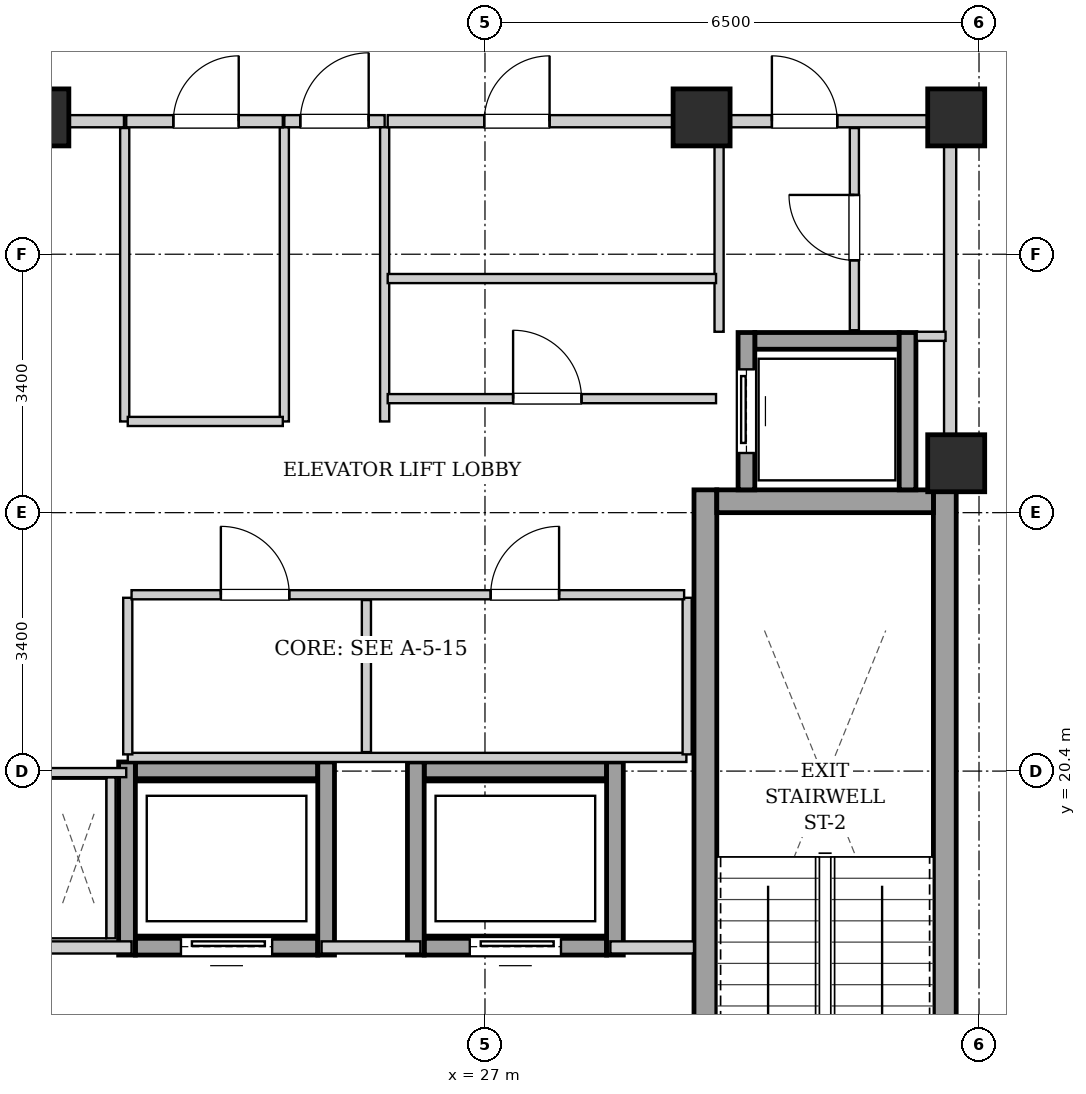
"""IFC4 building model, lengths in metres.
Left out: names, types, materials, properties, quantities, classifications, styles, units other than length and angle.
Written with IfcOpenShell. Run it as: python <this file> out.ifc"""

import sys

from ifc_helpers import new_model, si_unit, direction, frame, frame_2d, origin, origin_2d, place, context, subcontext, project, spatial, rectangle, extrude, element, fill, save


model = new_model("IFC4")
c1 = context("Model", 3, precision=1e-05, world=origin(), true_north=direction((0.0, 1.0)))
c2 = subcontext(c1, "Body", "Model", "MODEL_VIEW")
j1 = project(units=[si_unit("LENGTHUNIT", "METRE"), si_unit("PLANEANGLEUNIT", "RADIAN")], contexts=[c1])
p1 = place(None, origin())
s1 = spatial("IfcSite", under=j1, at=p1, CompositionType="ELEMENT")
p2 = place(p1, origin())
s2 = spatial("IfcBuilding", under=s1, at=p2, CompositionType="ELEMENT")
p3 = place(p2, frame((0.0, 0.0, 234.3)))
s3 = spatial("IfcBuildingStorey", under=s2, at=p3, CompositionType="ELEMENT", Elevation=234.3)
for number, where, z_axis, x_axis in (
    (1, (21.15, 29.0, 0.0), (0.0, 0.0, 1.0), (1.0, 0.0, 0.0)),
    (2, (29.85, 29.0, 0.0), (0.0, 0.0, 1.0), (1.0, 0.0, 0.0)),
    (3, (33.2, 29.0, 0.0), (0.0, 0.0, 1.0), (1.0, 0.0, 0.0)),
    (4, (33.2, 24.45, 0.0), (0.0, 0.0, 1.0), (1.0, 0.0, 0.0)),
):
    element("IfcColumn", number, at=place(p3, frame(where, z_axis=z_axis, x_axis=x_axis)), inside=s3, PredefinedType="COLUMN", context=c2, shape_type="SweptSolid", body=[
        extrude(rectangle(XDim=0.75, YDim=0.75, at=origin_2d()), origin(), (0.0, 0.0, 1.0), 3.4),
    ])
for number, where, z_axis, x_axis in (
    (5, (29.9, 15.1, 0.0), (0.0, 0.0, 1.0), (0.0, 1.0, 0.0)),
    (6, (33.05, 15.1, 0.0), (0.0, 0.0, 1.0), (0.0, 1.0, 0.0)),
):
    element("IfcWall", number, at=place(p3, frame(where, z_axis=z_axis, x_axis=x_axis)), inside=s3, PredefinedType="SHEAR", context=c2, shape_type="SweptSolid", body=[
        extrude(rectangle(XDim=9.0, YDim=0.3, at=frame_2d((4.5, 0.0))), origin(), (0.0, 0.0, 1.0), 3.14),
    ])
p4 = place(p3, frame((30.05, 23.95, 0.0), z_axis=(0.0, 0.0, 1.0), x_axis=(1.0, 0.0, 0.0)))
e7 = element("IfcWall", 7, at=p4, inside=s3, PredefinedType="SHEAR", context=c2, shape_type="SweptSolid", body=[
    extrude(rectangle(XDim=2.85, YDim=0.3, at=frame_2d((1.425, 0.0))), origin(), (0.0, 0.0, 1.0), 3.14),
])
p5 = place(p3, frame((30.55, 26.06, 0.0), z_axis=(0.0, 0.0, 1.0), x_axis=(1.0, 0.0, 0.0)))
e8 = element("IfcWall", 8, at=p5, inside=s3, PredefinedType="SHEAR", context=c2, shape_type="SweptSolid", body=[
    extrude(rectangle(XDim=1.9, YDim=0.22, at=frame_2d((0.95, 0.0))), origin(), (0.0, 0.0, 1.0), 3.14),
])
p6 = place(p3, frame((30.44, 24.1, 0.0), z_axis=(0.0, 0.0, 1.0), x_axis=(0.0, 1.0, 0.0)))
e9 = element("IfcWall", 9, at=p6, inside=s3, PredefinedType="SHEAR", context=c2, shape_type="SweptSolid", body=[
    extrude(rectangle(XDim=2.07, YDim=0.22, at=frame_2d((1.035, 0.0))), origin(), (0.0, 0.0, 1.0), 3.14),
])
p7 = place(p6, frame((0.485, 0.0, 0.0)))
e10 = element("IfcOpeningElement", 10, at=p7, cuts=e9, PredefinedType="OPENING", context=c2, shape_type="SweptSolid", body=[
    extrude(rectangle(XDim=1.1, YDim=2.15, at=frame_2d((0.55, 1.075))), frame((0.0, 0.12, 0.0), z_axis=(0.0, -1.0, 0.0), x_axis=(1.0, 0.0, 0.0)), (0.0, 0.0, 1.0), 0.24),
])
p8 = place(p3, frame((32.56, 24.1, 0.0), z_axis=(0.0, 0.0, 1.0), x_axis=(0.0, 1.0, 0.0)))
e11 = element("IfcWall", 11, at=p8, inside=s3, PredefinedType="SHEAR", context=c2, shape_type="SweptSolid", body=[
    extrude(rectangle(XDim=2.07, YDim=0.22, at=frame_2d((1.035, 0.0))), origin(), (0.0, 0.0, 1.0), 3.14),
])
p9 = place(p3, frame((22.4, 18.09, 0.0), z_axis=(0.0, 0.0, 1.0), x_axis=(1.0, 0.0, 0.0)))
e12 = element("IfcWall", 12, at=p9, inside=s3, PredefinedType="SHEAR", context=c2, shape_type="SweptSolid", body=[
    extrude(rectangle(XDim=2.4, YDim=0.22, at=frame_2d((1.2, 0.0))), origin(), (0.0, 0.0, 1.0), 3.14),
])
p10 = place(p9, frame((0.6, 0.0, 0.0)))
e13 = element("IfcOpeningElement", 13, at=p10, cuts=e12, PredefinedType="OPENING", context=c2, shape_type="SweptSolid", body=[
    extrude(rectangle(XDim=1.2, YDim=2.15, at=frame_2d((0.6, 1.075))), frame((0.0, 0.12, 0.0), z_axis=(0.0, -1.0, 0.0), x_axis=(1.0, 0.0, 0.0)), (0.0, 0.0, 1.0), 0.24),
])
p11 = place(p3, frame((22.4, 20.41, 0.0), z_axis=(0.0, 0.0, 1.0), x_axis=(1.0, 0.0, 0.0)))
e14 = element("IfcWall", 14, at=p11, inside=s3, PredefinedType="SHEAR", context=c2, shape_type="SweptSolid", body=[
    extrude(rectangle(XDim=2.4, YDim=0.22, at=frame_2d((1.2, 0.0))), origin(), (0.0, 0.0, 1.0), 3.14),
])
for number, where, z_axis, x_axis in (
    (15, (22.29, 17.98, 0.0), (0.0, 0.0, 1.0), (0.0, 1.0, 0.0)),
    (16, (24.91, 17.98, 0.0), (0.0, 0.0, 1.0), (0.0, 1.0, 0.0)),
):
    element("IfcWall", number, at=place(p3, frame(where, z_axis=z_axis, x_axis=x_axis)), inside=s3, PredefinedType="SHEAR", context=c2, shape_type="SweptSolid", body=[
        extrude(rectangle(XDim=2.54, YDim=0.22, at=frame_2d((1.27, 0.0))), origin(), (0.0, 0.0, 1.0), 3.14),
    ])
p12 = place(p3, frame((26.2, 18.09, 0.0), z_axis=(0.0, 0.0, 1.0), x_axis=(1.0, 0.0, 0.0)))
e17 = element("IfcWall", 17, at=p12, inside=s3, PredefinedType="SHEAR", context=c2, shape_type="SweptSolid", body=[
    extrude(rectangle(XDim=2.4, YDim=0.22, at=frame_2d((1.2, 0.0))), origin(), (0.0, 0.0, 1.0), 3.14),
])
p13 = place(p12, frame((0.6, 0.0, 0.0)))
e18 = element("IfcOpeningElement", 18, at=p13, cuts=e17, PredefinedType="OPENING", context=c2, shape_type="SweptSolid", body=[
    extrude(rectangle(XDim=1.2, YDim=2.15, at=frame_2d((0.6, 1.075))), frame((0.0, 0.12, 0.0), z_axis=(0.0, -1.0, 0.0), x_axis=(1.0, 0.0, 0.0)), (0.0, 0.0, 1.0), 0.24),
])
p14 = place(p3, frame((26.2, 20.41, 0.0), z_axis=(0.0, 0.0, 1.0), x_axis=(1.0, 0.0, 0.0)))
e19 = element("IfcWall", 19, at=p14, inside=s3, PredefinedType="SHEAR", context=c2, shape_type="SweptSolid", body=[
    extrude(rectangle(XDim=2.4, YDim=0.22, at=frame_2d((1.2, 0.0))), origin(), (0.0, 0.0, 1.0), 3.14),
])
for number, where, z_axis, x_axis in (
    (20, (26.09, 17.98, 0.0), (0.0, 0.0, 1.0), (0.0, 1.0, 0.0)),
    (21, (28.71, 17.98, 0.0), (0.0, 0.0, 1.0), (0.0, 1.0, 0.0)),
):
    element("IfcWall", number, at=place(p3, frame(where, z_axis=z_axis, x_axis=x_axis)), inside=s3, PredefinedType="SHEAR", context=c2, shape_type="SweptSolid", body=[
        extrude(rectangle(XDim=2.54, YDim=0.22, at=frame_2d((1.27, 0.0))), origin(), (0.0, 0.0, 1.0), 3.14),
    ])
p15 = place(p3, frame((21.25, 18.08, 0.0), z_axis=(0.0, 0.0, 1.0), x_axis=(1.0, 0.0, 0.0)))
e22 = element("IfcWall", 22, at=p15, inside=s3, PredefinedType="PARTITIONING", context=c2, shape_type="SweptSolid", body=[
    extrude(rectangle(XDim=1.1, YDim=0.16, at=frame_2d((0.55, 0.0))), origin(), (0.0, 0.0, 1.0), 3.14),
])
p16 = place(p3, frame((24.85, 18.08, 0.0), z_axis=(0.0, 0.0, 1.0), x_axis=(1.0, 0.0, 0.0)))
e23 = element("IfcWall", 23, at=p16, inside=s3, PredefinedType="PARTITIONING", context=c2, shape_type="SweptSolid", body=[
    extrude(rectangle(XDim=1.3, YDim=0.16, at=frame_2d((0.65, 0.0))), origin(), (0.0, 0.0, 1.0), 3.14),
])
p17 = place(p3, frame((28.65, 18.08, 0.0), z_axis=(0.0, 0.0, 1.0), x_axis=(1.0, 0.0, 0.0)))
e24 = element("IfcWall", 24, at=p17, inside=s3, PredefinedType="PARTITIONING", context=c2, shape_type="SweptSolid", body=[
    extrude(rectangle(XDim=1.1, YDim=0.16, at=frame_2d((0.55, 0.0))), origin(), (0.0, 0.0, 1.0), 3.14),
])
p18 = place(p3, frame((33.12, 24.12, 0.0), z_axis=(0.0, 0.0, 1.0), x_axis=(0.0, 1.0, 0.0)))
e25 = element("IfcWall", 25, at=p18, inside=s3, PredefinedType="PARTITIONING", context=c2, shape_type="SweptSolid", body=[
    extrude(rectangle(XDim=4.76, YDim=0.16, at=frame_2d((2.38, 0.0))), origin(), (0.0, 0.0, 1.0), 3.14),
])
p19 = place(p3, frame((24.36, 28.95, 0.0), z_axis=(0.0, 0.0, 1.0), x_axis=(1.0, 0.0, 0.0)))
e26 = element("IfcWall", 26, at=p19, inside=s3, PredefinedType="PARTITIONING", context=c2, shape_type="SweptSolid", body=[
    extrude(rectangle(XDim=1.32, YDim=0.16, at=frame_2d((0.66, 0.0))), origin(), (0.0, 0.0, 1.0), 2.668),
])
p20 = place(p19, frame((0.21, 0.0, 0.0)))
e27 = element("IfcOpeningElement", 27, at=p20, cuts=e26, PredefinedType="OPENING", context=c2, shape_type="SweptSolid", body=[
    extrude(rectangle(XDim=0.9, YDim=2.05, at=frame_2d((0.45, 1.025))), frame((0.0, 0.09, 0.0), z_axis=(0.0, -1.0, 0.0), x_axis=(1.0, 0.0, 0.0)), (0.0, 0.0, 1.0), 0.18),
])
p21 = place(p3, frame((17.96, 28.95, 0.0), z_axis=(0.0, 0.0, 1.0), x_axis=(1.0, 0.0, 0.0)))
e28 = element("IfcWall", 28, at=p21, inside=s3, PredefinedType="PARTITIONING", context=c2, shape_type="SweptSolid", body=[
    extrude(rectangle(XDim=4.29, YDim=0.16, at=frame_2d((2.145, 0.0))), origin(), (0.0, 0.0, 1.0), 2.668),
])
p22 = place(p21, frame((1.715, 0.0, 0.0)))
e29 = element("IfcOpeningElement", 29, at=p22, cuts=e28, PredefinedType="OPENING", context=c2, shape_type="SweptSolid", body=[
    extrude(rectangle(XDim=0.86, YDim=2.05, at=frame_2d((0.43, 1.025))), frame((0.0, 0.09, 0.0), z_axis=(0.0, -1.0, 0.0), x_axis=(1.0, 0.0, 0.0)), (0.0, 0.0, 1.0), 0.18),
])
p23 = place(p3, frame((22.08, 18.2, 0.0), z_axis=(0.0, 0.0, 1.0), x_axis=(0.0, 1.0, 0.0)))
e30 = element("IfcWall", 30, at=p23, inside=s3, PredefinedType="PARTITIONING", context=c2, shape_type="SweptSolid", body=[
    extrude(rectangle(XDim=2.12, YDim=0.12, at=frame_2d((1.06, 0.0))), origin(), (0.0, 0.0, 1.0), 3.14),
])
p24 = place(p3, frame((22.28, 20.38, 0.0), z_axis=(0.0, 0.0, 1.0), x_axis=(-1.0, 0.0, 0.0)))
e31 = element("IfcWall", 31, at=p24, inside=s3, PredefinedType="PARTITIONING", context=c2, shape_type="SweptSolid", body=[
    extrude(rectangle(XDim=1.02, YDim=0.12, at=frame_2d((0.51, 0.0))), origin(), (0.0, 0.0, 1.0), 3.14),
])
for number, where, z_axis, x_axis in (
    (32, (24.36, 25.0, 0.0), (0.0, 0.0, 1.0), (0.0, 1.0, 0.0)),
    (33, (25.68, 25.0, 0.0), (0.0, 0.0, 1.0), (0.0, 1.0, 0.0)),
):
    element("IfcWall", number, at=place(p3, frame(where, z_axis=z_axis, x_axis=x_axis)), inside=s3, PredefinedType="PARTITIONING", context=c2, shape_type="SweptSolid", body=[
        extrude(rectangle(XDim=3.87, YDim=0.12, at=frame_2d((1.935, 0.0))), origin(), (0.0, 0.0, 1.0), 3.14),
    ])
p25 = place(p3, frame((30.08, 26.18, 0.0), z_axis=(0.0, 0.0, 1.0), x_axis=(0.0, 1.0, 0.0)))
e34 = element("IfcWall", 34, at=p25, inside=s3, PredefinedType="PARTITIONING", context=c2, shape_type="SweptSolid", body=[
    extrude(rectangle(XDim=2.68, YDim=0.12, at=frame_2d((1.34, 0.0))), origin(), (0.0, 0.0, 1.0), 3.14),
])
p26 = place(p3, frame((32.68, 26.12, 0.0), z_axis=(0.0, 0.0, 1.0), x_axis=(1.0, 0.0, 0.0)))
e35 = element("IfcWall", 35, at=p26, inside=s3, PredefinedType="PARTITIONING", context=c2, shape_type="SweptSolid", body=[
    extrude(rectangle(XDim=0.38, YDim=0.12, at=frame_2d((0.19, 0.0))), origin(), (0.0, 0.0, 1.0), 3.14),
])
p27 = place(p3, frame((31.86, 26.2, 0.0), z_axis=(0.0, 0.0, 1.0), x_axis=(0.0, 1.0, 0.0)))
e36 = element("IfcWall", 36, at=p27, inside=s3, PredefinedType="PARTITIONING", context=c2, shape_type="SweptSolid", body=[
    extrude(rectangle(XDim=2.66, YDim=0.12, at=frame_2d((1.33, 0.0))), origin(), (0.0, 0.0, 1.0), 3.14),
])
p28 = place(p27, frame((0.92, 0.0, 0.0)))
e37 = element("IfcOpeningElement", 37, at=p28, cuts=e36, PredefinedType="OPENING", context=c2, shape_type="SweptSolid", body=[
    extrude(rectangle(XDim=0.86, YDim=2.05, at=frame_2d((0.43, 1.025))), frame((0.0, 0.07, 0.0), z_axis=(0.0, -1.0, 0.0), x_axis=(1.0, 0.0, 0.0)), (0.0, 0.0, 1.0), 0.14),
])
p29 = place(p3, frame((30.08, 28.95, 0.0), z_axis=(0.0, 0.0, 1.0), x_axis=(1.0, 0.0, 0.0)))
e38 = element("IfcWall", 38, at=p29, inside=s3, PredefinedType="PARTITIONING", context=c2, shape_type="SweptSolid", body=[
    extrude(rectangle(XDim=2.96, YDim=0.16, at=frame_2d((1.48, 0.0))), origin(), (0.0, 0.0, 1.0), 3.14),
])
p30 = place(p29, frame((0.695, 0.0, 0.0)))
e39 = element("IfcOpeningElement", 39, at=p30, cuts=e38, PredefinedType="OPENING", context=c2, shape_type="SweptSolid", body=[
    extrude(rectangle(XDim=0.86, YDim=2.05, at=frame_2d((0.43, 1.025))), frame((0.0, 0.09, 0.0), z_axis=(0.0, -1.0, 0.0), x_axis=(1.0, 0.0, 0.0)), (0.0, 0.0, 1.0), 0.18),
])
p31 = place(p3, frame((22.26, 25.0, 0.0), z_axis=(0.0, 0.0, 1.0), x_axis=(0.0, 1.0, 0.0)))
e40 = element("IfcWall", 40, at=p31, inside=s3, PredefinedType="PARTITIONING", context=c2, shape_type="SweptSolid", body=[
    extrude(rectangle(XDim=3.86, YDim=0.12, at=frame_2d((1.93, 0.0))), origin(), (0.0, 0.0, 1.0), 3.14),
])
p32 = place(p3, frame((22.3, 25.0, 0.0), z_axis=(0.0, 0.0, 1.0), x_axis=(1.0, 0.0, 0.0)))
e41 = element("IfcWall", 41, at=p32, inside=s3, PredefinedType="PARTITIONING", context=c2, shape_type="SweptSolid", body=[
    extrude(rectangle(XDim=2.04, YDim=0.12, at=frame_2d((1.02, 0.0))), origin(), (0.0, 0.0, 1.0), 3.14),
])
p33 = place(p3, frame((22.28, 28.95, 0.0), z_axis=(0.0, 0.0, 1.0), x_axis=(1.0, 0.0, 0.0)))
e42 = element("IfcWall", 42, at=p33, inside=s3, PredefinedType="PARTITIONING", context=c2, shape_type="SweptSolid", body=[
    extrude(rectangle(XDim=2.06, YDim=0.16, at=frame_2d((1.03, 0.0))), origin(), (0.0, 0.0, 1.0), 2.668),
])
p34 = place(p33, frame((0.62, 0.0, 0.0)))
e43 = element("IfcOpeningElement", 43, at=p34, cuts=e42, PredefinedType="OPENING", context=c2, shape_type="SweptSolid", body=[
    extrude(rectangle(XDim=0.86, YDim=2.05, at=frame_2d((0.43, 1.025))), frame((0.0, 0.09, 0.0), z_axis=(0.0, -1.0, 0.0), x_axis=(1.0, 0.0, 0.0)), (0.0, 0.0, 1.0), 0.18),
])
p35 = place(p3, frame((25.72, 26.88, 0.0), z_axis=(0.0, 0.0, 1.0), x_axis=(1.0, 0.0, 0.0)))
e44 = element("IfcWall", 44, at=p35, inside=s3, PredefinedType="PARTITIONING", context=c2, shape_type="SweptSolid", body=[
    extrude(rectangle(XDim=4.32, YDim=0.12, at=frame_2d((2.16, 0.0))), origin(), (0.0, 0.0, 1.0), 3.14),
])
p36 = place(p3, frame((25.72, 25.3, 0.0), z_axis=(0.0, 0.0, 1.0), x_axis=(1.0, 0.0, 0.0)))
e45 = element("IfcWall", 45, at=p36, inside=s3, PredefinedType="PARTITIONING", context=c2, shape_type="SweptSolid", body=[
    extrude(rectangle(XDim=4.32, YDim=0.12, at=frame_2d((2.16, 0.0))), origin(), (0.0, 0.0, 1.0), 3.14),
])
p37 = place(p36, frame((1.65, 0.0, 0.0)))
e46 = element("IfcOpeningElement", 46, at=p37, cuts=e45, PredefinedType="OPENING", context=c2, shape_type="SweptSolid", body=[
    extrude(rectangle(XDim=0.9, YDim=2.05, at=frame_2d((0.45, 1.025))), frame((0.0, 0.07, 0.0), z_axis=(0.0, -1.0, 0.0), x_axis=(1.0, 0.0, 0.0)), (0.0, 0.0, 1.0), 0.14),
])
p38 = place(p3, frame((25.72, 28.95, 0.0), z_axis=(0.0, 0.0, 1.0), x_axis=(1.0, 0.0, 0.0)))
e47 = element("IfcWall", 47, at=p38, inside=s3, PredefinedType="PARTITIONING", context=c2, shape_type="SweptSolid", body=[
    extrude(rectangle(XDim=4.32, YDim=0.16, at=frame_2d((2.16, 0.0))), origin(), (0.0, 0.0, 1.0), 2.668),
])
p39 = place(p38, frame((1.27, 0.0, 0.0)))
e48 = element("IfcOpeningElement", 48, at=p39, cuts=e47, PredefinedType="OPENING", context=c2, shape_type="SweptSolid", body=[
    extrude(rectangle(XDim=0.86, YDim=2.05, at=frame_2d((0.43, 1.025))), frame((0.0, 0.09, 0.0), z_axis=(0.0, -1.0, 0.0), x_axis=(1.0, 0.0, 0.0)), (0.0, 0.0, 1.0), 0.18),
])
p40 = place(p3, frame((22.3, 20.58, 0.0), z_axis=(0.0, 0.0, 1.0), x_axis=(1.0, 0.0, 0.0)))
e49 = element("IfcWall", 49, at=p40, inside=s3, PredefinedType="PARTITIONING", context=c2, shape_type="SweptSolid", body=[
    extrude(rectangle(XDim=7.35, YDim=0.12, at=frame_2d((3.675, 0.0))), origin(), (0.0, 0.0, 1.0), 3.14),
])
for number, where, z_axis, x_axis in (
    (50, (22.3, 20.62, 0.0), (0.0, 0.0, 1.0), (0.0, 1.0, 0.0)),
    (51, (29.66, 20.62, 0.0), (0.0, 0.0, 1.0), (0.0, 1.0, 0.0)),
):
    element("IfcWall", number, at=place(p3, frame(where, z_axis=z_axis, x_axis=x_axis)), inside=s3, PredefinedType="PARTITIONING", context=c2, shape_type="SweptSolid", body=[
        extrude(rectangle(XDim=2.06, YDim=0.12, at=frame_2d((1.03, 0.0))), origin(), (0.0, 0.0, 1.0), 3.14),
    ])
p41 = place(p3, frame((25.44, 20.65, 0.0), z_axis=(0.0, 0.0, 1.0), x_axis=(0.0, 1.0, 0.0)))
e52 = element("IfcWall", 52, at=p41, inside=s3, PredefinedType="PARTITIONING", context=c2, shape_type="SweptSolid", body=[
    extrude(rectangle(XDim=2.0, YDim=0.12, at=frame_2d((1.0, 0.0))), origin(), (0.0, 0.0, 1.0), 3.14),
])
p42 = place(p3, frame((22.35, 22.72, 0.0), z_axis=(0.0, 0.0, 1.0), x_axis=(1.0, 0.0, 0.0)))
e53 = element("IfcWall", 53, at=p42, inside=s3, PredefinedType="PARTITIONING", context=c2, shape_type="SweptSolid", body=[
    extrude(rectangle(XDim=7.27, YDim=0.12, at=frame_2d((3.635, 0.0))), origin(), (0.0, 0.0, 1.0), 3.14),
])
p43 = place(p42, frame((1.175, 0.0, 0.0)))
e54 = element("IfcOpeningElement", 54, at=p43, cuts=e53, PredefinedType="OPENING", context=c2, shape_type="SweptSolid", body=[
    extrude(rectangle(XDim=0.9, YDim=2.05, at=frame_2d((0.45, 1.025))), frame((0.0, 0.07, 0.0), z_axis=(0.0, -1.0, 0.0), x_axis=(1.0, 0.0, 0.0)), (0.0, 0.0, 1.0), 0.14),
])
p44 = place(p42, frame((4.725, 0.0, 0.0)))
e55 = element("IfcOpeningElement", 55, at=p44, cuts=e53, PredefinedType="OPENING", context=c2, shape_type="SweptSolid", body=[
    extrude(rectangle(XDim=0.9, YDim=2.05, at=frame_2d((0.45, 1.025))), frame((0.0, 0.07, 0.0), z_axis=(0.0, -1.0, 0.0), x_axis=(1.0, 0.0, 0.0)), (0.0, 0.0, 1.0), 0.14),
])
p45 = place(p7, origin())
e56 = element("IfcDoor", 56, at=p45, inside=s3, OperationType="SLIDING_TO_LEFT", PredefinedType="DOOR", context=c2, shape_type="SweptSolid", body=[
    extrude(rectangle(XDim=1.1, YDim=2.15, at=frame_2d((0.55, 1.075))), frame((0.0, 0.025, 0.0), z_axis=(0.0, -1.0, 0.0), x_axis=(1.0, 0.0, 0.0)), (0.0, 0.0, 1.0), 0.05),
])
fill(e10, e56)
p46 = place(p10, origin())
e57 = element("IfcDoor", 57, at=p46, inside=s3, OperationType="SLIDING_TO_LEFT", PredefinedType="DOOR", context=c2, shape_type="SweptSolid", body=[
    extrude(rectangle(XDim=1.2, YDim=2.15, at=frame_2d((0.6, 1.075))), frame((0.0, 0.025, 0.0), z_axis=(0.0, -1.0, 0.0), x_axis=(1.0, 0.0, 0.0)), (0.0, 0.0, 1.0), 0.05),
])
fill(e13, e57)
p47 = place(p13, origin())
e58 = element("IfcDoor", 58, at=p47, inside=s3, OperationType="SLIDING_TO_LEFT", PredefinedType="DOOR", context=c2, shape_type="SweptSolid", body=[
    extrude(rectangle(XDim=1.2, YDim=2.15, at=frame_2d((0.6, 1.075))), frame((0.0, 0.025, 0.0), z_axis=(0.0, -1.0, 0.0), x_axis=(1.0, 0.0, 0.0)), (0.0, 0.0, 1.0), 0.05),
])
fill(e18, e58)
p48 = place(p20, origin())
e59 = element("IfcDoor", 59, at=p48, inside=s3, OperationType="SINGLE_SWING_RIGHT", PredefinedType="DOOR", context=c2, shape_type="SweptSolid", body=[
    extrude(rectangle(XDim=0.9, YDim=2.05, at=frame_2d((0.45, 1.025))), frame((0.0, 0.025, 0.0), z_axis=(0.0, -1.0, 0.0), x_axis=(1.0, 0.0, 0.0)), (0.0, 0.0, 1.0), 0.05),
])
fill(e27, e59)
p49 = place(p28, origin())
e60 = element("IfcDoor", 60, at=p49, inside=s3, OperationType="SINGLE_SWING_RIGHT", PredefinedType="DOOR", context=c2, shape_type="SweptSolid", body=[
    extrude(rectangle(XDim=0.86, YDim=2.05, at=frame_2d((0.43, 1.025))), frame((0.0, 0.025, 0.0), z_axis=(0.0, -1.0, 0.0), x_axis=(1.0, 0.0, 0.0)), (0.0, 0.0, 1.0), 0.05),
])
fill(e37, e60)
p50 = place(p30, origin())
e61 = element("IfcDoor", 61, at=p50, inside=s3, OperationType="SINGLE_SWING_LEFT", PredefinedType="DOOR", context=c2, shape_type="SweptSolid", body=[
    extrude(rectangle(XDim=0.86, YDim=2.05, at=frame_2d((0.43, 1.025))), frame((0.0, 0.025, 0.0), z_axis=(0.0, -1.0, 0.0), x_axis=(1.0, 0.0, 0.0)), (0.0, 0.0, 1.0), 0.05),
])
fill(e39, e61)
p51 = place(p34, origin())
e62 = element("IfcDoor", 62, at=p51, inside=s3, OperationType="SINGLE_SWING_RIGHT", PredefinedType="DOOR", context=c2, shape_type="SweptSolid", body=[
    extrude(rectangle(XDim=0.86, YDim=2.05, at=frame_2d((0.43, 1.025))), frame((0.0, 0.025, 0.0), z_axis=(0.0, -1.0, 0.0), x_axis=(1.0, 0.0, 0.0)), (0.0, 0.0, 1.0), 0.05),
])
fill(e43, e62)
p52 = place(p37, origin())
e63 = element("IfcDoor", 63, at=p52, inside=s3, OperationType="SINGLE_SWING_LEFT", PredefinedType="DOOR", context=c2, shape_type="SweptSolid", body=[
    extrude(rectangle(XDim=0.9, YDim=2.05, at=frame_2d((0.45, 1.025))), frame((0.0, 0.025, 0.0), z_axis=(0.0, -1.0, 0.0), x_axis=(1.0, 0.0, 0.0)), (0.0, 0.0, 1.0), 0.05),
])
fill(e46, e63)
p53 = place(p39, origin())
e64 = element("IfcDoor", 64, at=p53, inside=s3, OperationType="SINGLE_SWING_RIGHT", PredefinedType="DOOR", context=c2, shape_type="SweptSolid", body=[
    extrude(rectangle(XDim=0.86, YDim=2.05, at=frame_2d((0.43, 1.025))), frame((0.0, 0.025, 0.0), z_axis=(0.0, -1.0, 0.0), x_axis=(1.0, 0.0, 0.0)), (0.0, 0.0, 1.0), 0.05),
])
fill(e48, e64)
p54 = place(p43, origin())
e65 = element("IfcDoor", 65, at=p54, inside=s3, OperationType="SINGLE_SWING_LEFT", PredefinedType="DOOR", context=c2, shape_type="SweptSolid", body=[
    extrude(rectangle(XDim=0.9, YDim=2.05, at=frame_2d((0.45, 1.025))), frame((0.0, 0.025, 0.0), z_axis=(0.0, -1.0, 0.0), x_axis=(1.0, 0.0, 0.0)), (0.0, 0.0, 1.0), 0.05),
])
fill(e54, e65)
p55 = place(p44, origin())
e66 = element("IfcDoor", 66, at=p55, inside=s3, OperationType="SINGLE_SWING_RIGHT", PredefinedType="DOOR", context=c2, shape_type="SweptSolid", body=[
    extrude(rectangle(XDim=0.9, YDim=2.05, at=frame_2d((0.45, 1.025))), frame((0.0, 0.025, 0.0), z_axis=(0.0, -1.0, 0.0), x_axis=(1.0, 0.0, 0.0)), (0.0, 0.0, 1.0), 0.05),
])
fill(e55, e66)
save(model, sys.argv[1])
